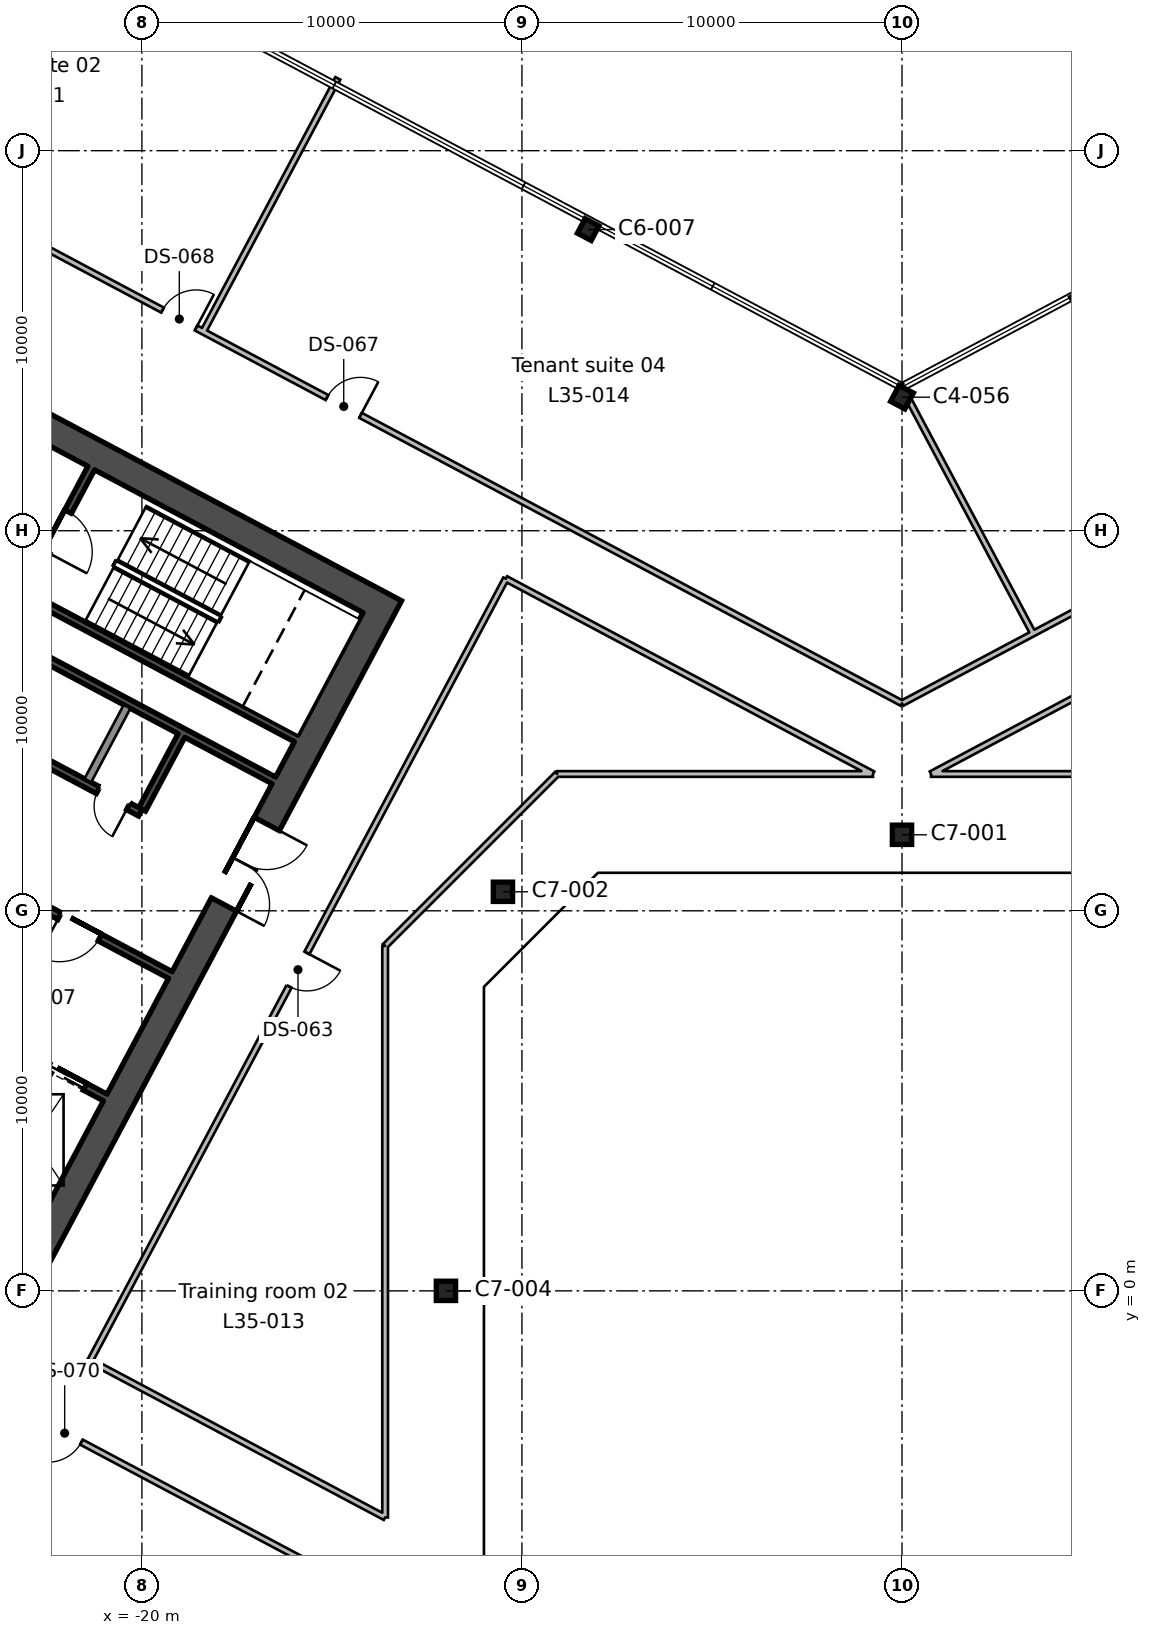
"""IFC4 building model, lengths in metres.
Left out: names, types, materials, properties, quantities, classifications, styles, units other than length and angle.
Written with IfcOpenShell. Run it as: python <this file> out.ifc"""

import sys

from ifc_helpers import new_model, si_unit, direction, frame, frame_2d, origin, origin_2d, place, context, subcontext, project, spatial, rectangle, hollow_rectangle, i_section, extrude, element, fill, save


model = new_model("IFC4")
c1 = context("Model", 3, precision=1e-05, world=origin(), true_north=direction((0.0, 1.0)))
c2 = subcontext(c1, "Body", "Model", "MODEL_VIEW")
j1 = project(units=[si_unit("LENGTHUNIT", "METRE"), si_unit("PLANEANGLEUNIT", "RADIAN")], contexts=[c1])
p1 = place(None, origin())
s1 = spatial("IfcSite", under=j1, at=p1, CompositionType="ELEMENT")
p2 = place(p1, origin())
s2 = spatial("IfcBuilding", under=s1, at=p2, CompositionType="ELEMENT")
p3 = place(p2, frame((0.0, 0.0, 166.2)))
s3 = spatial("IfcBuildingStorey", under=s2, at=p3, CompositionType="ELEMENT", Elevation=166.2)
for number, where, z_axis, x_axis in (
    (1, (-12.0, 0.0, 0.0), (0.0, 0.0, 1.0), (1.0, 0.0, 0.0)),
    (2, (-10.5, 10.5, 0.0), (0.0, 0.0, 1.0), (1.0, 0.0, 0.0)),
    (3, (0.0, 12.0, 0.0), (0.0, 0.0, 1.0), (1.0, 0.0, 0.0)),
):
    element("IfcColumn", number, at=place(p3, frame(where, z_axis=z_axis, x_axis=x_axis)), inside=s3, PredefinedType="COLUMN", context=c2, shape_type="SweptSolid", body=[
        extrude(hollow_rectangle(XDim=0.508, YDim=0.508, WallThickness=0.012, InnerFilletRadius=0.006, OuterFilletRadius=0.018, at=origin_2d()), origin(), (0.0, 0.0, 1.0), 4.0),
    ])
p4 = place(p3, frame((0.0, 23.514, 0.0), z_axis=(0.0, 0.0, 1.0), x_axis=(-0.882947592859, 0.469471562786, 0.0)))
e4 = element("IfcColumn", 4, at=p4, inside=s3, PredefinedType="COLUMN", context=c2, shape_type="SweptSolid", body=[
    extrude(i_section(OverallWidth=0.424, OverallDepth=0.475, WebThickness=0.048, FlangeThickness=0.077, FilletRadius=0.015, at=origin_2d()), origin(), (0.0, 0.0, 1.0), 4.0),
])
for number, where, z_axis, x_axis in (
    (5, (4.725, 26.047, 0.0), (0.0, 0.0, 1.0), (-0.883, -0.469, 0.0)),
    (6, (-8.257, 27.925, 0.0), (0.0, 0.0, 1.0), (-0.883, 0.469, 0.0)),
):
    element("IfcColumn", number, at=place(p3, frame(where, z_axis=z_axis, x_axis=x_axis)), inside=s3, PredefinedType="COLUMN", context=c2, shape_type="SweptSolid", body=[
        extrude(i_section(OverallWidth=0.412, OverallDepth=0.434, WebThickness=0.036, FlangeThickness=0.057, FilletRadius=0.015, at=origin_2d()), origin(), (0.0, 0.0, 1.0), 4.0),
    ])
p5 = place(p3, frame((-13.498, 18.333, 0.0), z_axis=(0.0, 0.0, 1.0), x_axis=(-0.469469918705, -0.88294846703, 0.0)))
e7 = element("IfcWall", 7, at=p5, inside=s3, PredefinedType="SHEAR", context=c2, shape_type="SweptSolid", body=[
    extrude(rectangle(XDim=19.7, YDim=0.75, at=frame_2d((9.85, 0.0))), origin(), (0.0, 0.0, 1.0), 4.0),
])
p6 = place(p5, frame((6.85, 0.0, 0.0)))
e8 = element("IfcOpeningElement", 8, at=p6, cuts=e7, PredefinedType="OPENING", context=c2, shape_type="SweptSolid", body=[
    extrude(rectangle(XDim=2.4, YDim=2.4, at=frame_2d((1.2, 1.2))), frame((0.0, 0.385, 0.0), z_axis=(0.0, -1.0, 0.0), x_axis=(1.0, 0.0, 0.0)), (0.0, 0.0, 1.0), 0.77),
])
p7 = place(p3, frame((-14.005, 18.178, 0.0), z_axis=(0.0, 0.0, 1.0), x_axis=(-0.88295010195, 0.469466843842, 0.0)))
e9 = element("IfcWall", 9, at=p7, inside=s3, PredefinedType="SHEAR", context=c2, shape_type="SweptSolid", body=[
    extrude(rectangle(XDim=20.2, YDim=0.75, at=frame_2d((10.1, 0.0))), origin(), (0.0, 0.0, 1.0), 4.0),
])
p8 = place(p3, frame((-18.96, 14.611, 0.0), z_axis=(0.0, 0.0, 1.0), x_axis=(-0.4694473164, -0.882960484464, 0.0)))
e10 = element("IfcWall", 10, at=p8, inside=s3, PredefinedType="SHEAR", context=c2, shape_type="SweptSolid", body=[
    extrude(rectangle(XDim=2.2, YDim=0.2, at=frame_2d((1.1, 0.0))), origin(), (0.0, 0.0, 1.0), 4.0),
])
p9 = place(p3, frame((-20.39, 15.372, 0.0), z_axis=(0.0, 0.0, 1.0), x_axis=(-0.4694473164, -0.882960484464, 0.0)))
e11 = element("IfcWall", 11, at=p9, inside=s3, PredefinedType="SOLIDWALL", context=c2, shape_type="SweptSolid", body=[
    extrude(rectangle(XDim=2.2, YDim=0.2, at=frame_2d((1.1, 0.0))), origin(), (0.0, 0.0, 1.0), 4.0),
])
p10 = place(p3, frame((-21.333, 21.649, 0.0), z_axis=(0.0, 0.0, 1.0), x_axis=(-0.469494272526, -0.882935517501, 0.0)))
e12 = element("IfcWall", 12, at=p10, inside=s3, PredefinedType="SHEAR", context=c2, shape_type="SweptSolid", body=[
    extrude(rectangle(XDim=7.3, YDim=0.2, at=frame_2d((3.65, 0.0))), origin(), (0.0, 0.0, 1.0), 4.0),
])
p11 = place(p10, frame((1.3, 0.0, 0.0)))
e13 = element("IfcOpeningElement", 13, at=p11, cuts=e12, PredefinedType="OPENING", context=c2, shape_type="SweptSolid", body=[
    extrude(rectangle(XDim=1.2, YDim=2.1, at=frame_2d((0.6, 1.05))), frame((0.0, 0.11, 0.0), z_axis=(0.0, -1.0, 0.0), x_axis=(1.0, 0.0, 0.0)), (0.0, 0.0, 1.0), 0.22),
])
p12 = place(p3, frame((-15.942, 14.536, 0.0), z_axis=(0.0, 0.0, 1.0), x_axis=(-0.882946947542, 0.469472776449, 0.0)))
e14 = element("IfcWall", 14, at=p12, inside=s3, PredefinedType="SHEAR", context=c2, shape_type="SweptSolid", body=[
    extrude(rectangle(XDim=8.0, YDim=0.2, at=frame_2d((4.0, 0.0))), origin(), (0.0, 0.0, 1.0), 4.0),
])
p13 = place(p3, frame((-16.529, 13.432, 0.0), z_axis=(0.0, 0.0, 1.0), x_axis=(-0.88295287151, 0.469461634952, 0.0)))
e15 = element("IfcWall", 15, at=p13, inside=s3, PredefinedType="SHEAR", context=c2, shape_type="SweptSolid", body=[
    extrude(rectangle(XDim=8.0, YDim=0.2, at=frame_2d((4.0, 0.0))), origin(), (0.0, 0.0, 1.0), 4.0),
])
p14 = place(p3, frame((-20.04, 12.581, 0.0), z_axis=(0.0, 0.0, 1.0), x_axis=(-0.882942972946, 0.469480251476, 0.0)))
e16 = element("IfcWall", 16, at=p14, inside=s3, PredefinedType="SHEAR", context=c2, shape_type="SweptSolid", body=[
    extrude(rectangle(XDim=5.4, YDim=0.2, at=frame_2d((2.7, 0.0))), origin(), (0.0, 0.0, 1.0), 4.0),
])
p15 = place(p14, frame((0.36, 0.0, 0.0)))
e17 = element("IfcOpeningElement", 17, at=p15, cuts=e16, PredefinedType="OPENING", context=c2, shape_type="SweptSolid", body=[
    extrude(rectangle(XDim=0.9, YDim=2.1, at=frame_2d((0.45, 1.05))), frame((0.0, 0.11, 0.0), z_axis=(0.0, -1.0, 0.0), x_axis=(1.0, 0.0, 0.0)), (0.0, 0.0, 1.0), 0.22),
])
p16 = place(p14, frame((3.06, 0.0, 0.0)))
e18 = element("IfcOpeningElement", 18, at=p16, cuts=e16, PredefinedType="OPENING", context=c2, shape_type="SweptSolid", body=[
    extrude(rectangle(XDim=0.9, YDim=2.1, at=frame_2d((0.45, 1.05))), frame((0.0, 0.11, 0.0), z_axis=(0.0, -1.0, 0.0), x_axis=(1.0, 0.0, 0.0)), (0.0, 0.0, 1.0), 0.22),
])
p17 = place(p3, frame((-19.252, 8.311, 0.0), z_axis=(0.0, 0.0, 1.0), x_axis=(-0.882955722218, 0.469456273365, 0.0)))
e19 = element("IfcWall", 19, at=p17, inside=s3, PredefinedType="SHEAR", context=c2, shape_type="SweptSolid", body=[
    extrude(rectangle(XDim=10.0, YDim=0.2, at=frame_2d((5.0, 0.0))), origin(), (0.0, 0.0, 1.0), 4.0),
])
p18 = place(p17, frame((2.1, 0.0, 0.0)))
e20 = element("IfcOpeningElement", 20, at=p18, cuts=e19, PredefinedType="OPENING", context=c2, shape_type="SweptSolid", body=[
    extrude(rectangle(XDim=1.2, YDim=2.1, at=frame_2d((0.6, 1.05))), frame((0.0, 0.11, 0.0), z_axis=(0.0, -1.0, 0.0), x_axis=(1.0, 0.0, 0.0)), (0.0, 0.0, 1.0), 0.22),
])
p19 = place(p3, frame((-20.965, 5.088, 0.0), z_axis=(0.0, 0.0, 1.0), x_axis=(-0.882925986334, 0.469512196493, 0.0)))
e21 = element("IfcWall", 21, at=p19, inside=s3, PredefinedType="SHEAR", context=c2, shape_type="SweptSolid", body=[
    extrude(rectangle(XDim=4.5, YDim=0.2, at=frame_2d((2.25, 0.0))), origin(), (0.0, 0.0, 1.0), 4.0),
])
p20 = place(p19, frame((0.6, 0.0, 0.0)))
e22 = element("IfcOpeningElement", 22, at=p20, cuts=e21, PredefinedType="OPENING", context=c2, shape_type="SweptSolid", body=[
    extrude(rectangle(XDim=1.1, YDim=2.1, at=frame_2d((0.55, 1.05))), frame((0.0, 0.11, 0.0), z_axis=(0.0, -1.0, 0.0), x_axis=(1.0, 0.0, 0.0)), (0.0, 0.0, 1.0), 0.22),
])
p21 = place(p3, frame((-13.6, -8.228, 0.0), z_axis=(0.0, 0.0, 1.0), x_axis=(-0.882954510497, 0.469458552369, 0.0)))
e23 = element("IfcWall", 23, at=p21, inside=s3, PredefinedType="PARTITIONING", context=c2, shape_type="SweptSolid", body=[
    extrude(rectangle(XDim=34.953, YDim=0.15, at=frame_2d((17.477, 0.0))), origin(), (0.0, 0.0, 1.0), 3.64),
])
p22 = place(p21, frame((16.55, 0.0, 0.0)))
e24 = element("IfcOpeningElement", 24, at=p22, cuts=e23, PredefinedType="OPENING", context=c2, shape_type="SweptSolid", body=[
    extrude(rectangle(XDim=1.8, YDim=2.1, at=frame_2d((0.9, 1.05))), frame((0.0, 0.085, 0.0), z_axis=(0.0, -1.0, 0.0), x_axis=(1.0, 0.0, 0.0)), (0.0, 0.0, 1.0), 0.17),
])
p23 = place(p21, frame((9.05, 0.0, 0.0)))
e25 = element("IfcOpeningElement", 25, at=p23, cuts=e23, PredefinedType="OPENING", context=c2, shape_type="SweptSolid", body=[
    extrude(rectangle(XDim=1.0, YDim=2.1, at=frame_2d((0.5, 1.05))), frame((0.0, 0.085, 0.0), z_axis=(0.0, -1.0, 0.0), x_axis=(1.0, 0.0, 0.0)), (0.0, 0.0, 1.0), 0.17),
])
p24 = place(p3, frame((-29.302, 31.04, 0.0), z_axis=(0.0, 0.0, 1.0), x_axis=(0.882948500672, -0.469469855433, 0.0)))
e26 = element("IfcWall", 26, at=p24, inside=s3, PredefinedType="PARTITIONING", context=c2, shape_type="SweptSolid", body=[
    extrude(rectangle(XDim=33.187, YDim=0.15, at=frame_2d((16.593, 0.0))), origin(), (0.0, 0.0, 1.0), 3.64),
])
p25 = place(p24, frame((16.05, 0.0, 0.0)))
e27 = element("IfcOpeningElement", 27, at=p25, cuts=e26, PredefinedType="OPENING", context=c2, shape_type="SweptSolid", body=[
    extrude(rectangle(XDim=1.0, YDim=2.1, at=frame_2d((0.5, 1.05))), frame((0.0, 0.085, 0.0), z_axis=(0.0, -1.0, 0.0), x_axis=(1.0, 0.0, 0.0)), (0.0, 0.0, 1.0), 0.17),
])
p26 = place(p24, frame((11.15, 0.0, 0.0)))
e28 = element("IfcOpeningElement", 28, at=p26, cuts=e26, PredefinedType="OPENING", context=c2, shape_type="SweptSolid", body=[
    extrude(rectangle(XDim=1.0, YDim=2.1, at=frame_2d((0.5, 1.05))), frame((0.0, 0.085, 0.0), z_axis=(0.0, -1.0, 0.0), x_axis=(1.0, 0.0, 0.0)), (0.0, 0.0, 1.0), 0.17),
])
p27 = place(p3, frame((0.0, 15.46, 0.0), z_axis=(0.0, 0.0, 1.0), x_axis=(0.882949722977, 0.469467556594, 0.0)))
e29 = element("IfcWall", 29, at=p27, inside=s3, PredefinedType="PARTITIONING", context=c2, shape_type="SweptSolid", body=[
    extrude(rectangle(XDim=20.021, YDim=0.15, at=frame_2d((10.01, 0.0))), origin(), (0.0, 0.0, 1.0), 3.64),
])
p28 = place(p27, frame((9.55, 0.0, 0.0)))
e30 = element("IfcOpeningElement", 30, at=p28, cuts=e29, PredefinedType="OPENING", context=c2, shape_type="SweptSolid", body=[
    extrude(rectangle(XDim=1.0, YDim=2.1, at=frame_2d((0.5, 1.05))), frame((0.0, 0.085, 0.0), z_axis=(0.0, -1.0, 0.0), x_axis=(1.0, 0.0, 0.0)), (0.0, 0.0, 1.0), 0.17),
])
p29 = place(p3, frame((-14.844, 31.903, 0.0), z_axis=(0.0, 0.0, 1.0), x_axis=(-0.469271860983, -0.883053747226, 0.0)))
e31 = element("IfcWall", 31, at=p29, inside=s3, PredefinedType="PARTITIONING", context=c2, shape_type="SweptSolid", body=[
    extrude(rectangle(XDim=7.55, YDim=0.15, at=frame_2d((3.775, 0.0))), origin(), (0.0, 0.0, 1.0), 3.64),
])
p30 = place(p3, frame((0.191, 23.422, 0.0), z_axis=(0.0, 0.0, 1.0), x_axis=(0.46954180368, -0.882910241529, 0.0)))
e32 = element("IfcWall", 32, at=p30, inside=s3, PredefinedType="PARTITIONING", context=c2, shape_type="SweptSolid", body=[
    extrude(rectangle(XDim=6.941, YDim=0.15, at=frame_2d((3.47, 0.0))), origin(), (0.0, 0.0, 1.0), 3.64),
])
p31 = place(p3, frame((-21.362, -1.836, 0.0), z_axis=(0.0, 0.0, 1.0), x_axis=(0.469442492633, 0.88296304912, 0.0)))
e33 = element("IfcWall", 33, at=p31, inside=s3, PredefinedType="PARTITIONING", context=c2, shape_type="SweptSolid", body=[
    extrude(rectangle(XDim=23.3, YDim=0.15, at=frame_2d((11.65, 0.0))), origin(), (0.0, 0.0, 1.0), 3.64),
])
p32 = place(p31, frame((11.15, 0.0, 0.0)))
e34 = element("IfcOpeningElement", 34, at=p32, cuts=e33, PredefinedType="OPENING", context=c2, shape_type="SweptSolid", body=[
    extrude(rectangle(XDim=1.0, YDim=2.1, at=frame_2d((0.5, 1.05))), frame((0.0, 0.085, 0.0), z_axis=(0.0, -1.0, 0.0), x_axis=(1.0, 0.0, 0.0)), (0.0, 0.0, 1.0), 0.17),
])
p33 = place(p3, frame((-10.424, 18.737, 0.0), z_axis=(0.0, 0.0, 1.0), x_axis=(0.88294579514, -0.469474943787, 0.0)))
e35 = element("IfcWall", 35, at=p33, inside=s3, PredefinedType="PARTITIONING", context=c2, shape_type="SweptSolid", body=[
    extrude(rectangle(XDim=10.942, YDim=0.15, at=frame_2d((5.471, 0.0))), origin(), (0.0, 0.0, 1.0), 3.64),
])
p34 = place(p3, frame((-0.763, 13.6, 0.0), z_axis=(0.0, 0.0, 1.0), x_axis=(-1.0, 0.0, 0.0)))
e36 = element("IfcWall", 36, at=p34, inside=s3, PredefinedType="PARTITIONING", context=c2, shape_type="SweptSolid", body=[
    extrude(rectangle(XDim=8.314, YDim=0.15, at=frame_2d((4.157, 0.0))), origin(), (0.0, 0.0, 1.0), 3.64),
])
p35 = place(p3, frame((-9.077, 13.6, 0.0), z_axis=(0.0, 0.0, 1.0), x_axis=(-0.707106781187, -0.707106781187, 0.0)))
e37 = element("IfcWall", 37, at=p35, inside=s3, PredefinedType="PARTITIONING", context=c2, shape_type="SweptSolid", body=[
    extrude(rectangle(XDim=6.397, YDim=0.15, at=frame_2d((3.198, 0.0))), origin(), (0.0, 0.0, 1.0), 3.64),
])
p36 = place(p3, frame((-13.6, 9.077, 0.0), z_axis=(0.0, 0.0, 1.0), x_axis=(0.0, -1.0, 0.0)))
e38 = element("IfcWall", 38, at=p36, inside=s3, PredefinedType="PARTITIONING", context=c2, shape_type="SweptSolid", body=[
    extrude(rectangle(XDim=15.04, YDim=0.15, at=frame_2d((7.52, 0.0))), origin(), (0.0, 0.0, 1.0), 3.64),
])
p37 = place(p3, frame((-13.6, -5.963, 0.0), z_axis=(0.0, 0.0, 1.0), x_axis=(-0.882954936964, 0.469457750273, 0.0)))
e39 = element("IfcWall", 39, at=p37, inside=s3, PredefinedType="PARTITIONING", context=c2, shape_type="SweptSolid", body=[
    extrude(rectangle(XDim=8.791, YDim=0.15, at=frame_2d((4.396, 0.0))), origin(), (0.0, 0.0, 1.0), 3.64),
])
p38 = place(p3, frame((0.763, 13.6, 0.0), z_axis=(0.0, 0.0, 1.0), x_axis=(1.0, 0.0, 0.0)))
e40 = element("IfcWall", 40, at=p38, inside=s3, PredefinedType="PARTITIONING", context=c2, shape_type="SweptSolid", body=[
    extrude(rectangle(XDim=7.862, YDim=0.15, at=frame_2d((3.931, 0.0))), origin(), (0.0, 0.0, 1.0), 3.64),
])
p39 = place(p3, frame((6.892, 16.859, 0.0), z_axis=(0.0, 0.0, 1.0), x_axis=(-0.882955833877, -0.469456063357, 0.0)))
e41 = element("IfcWall", 41, at=p39, inside=s3, PredefinedType="PARTITIONING", context=c2, shape_type="SweptSolid", body=[
    extrude(rectangle(XDim=6.942, YDim=0.15, at=frame_2d((3.471, 0.0))), origin(), (0.0, 0.0, 1.0), 3.64),
])
p40 = place(p6, origin())
e42 = element("IfcDoor", 42, at=p40, inside=s3, OperationType="DOUBLE_DOOR_SINGLE_SWING", PredefinedType="DOOR", context=c2, shape_type="SweptSolid", body=[
    extrude(rectangle(XDim=2.4, YDim=2.4, at=frame_2d((1.2, 1.2))), frame((0.0, 0.025, 0.0), z_axis=(0.0, -1.0, 0.0), x_axis=(1.0, 0.0, 0.0)), (0.0, 0.0, 1.0), 0.05),
])
fill(e8, e42)
p41 = place(p18, origin())
e43 = element("IfcDoor", 43, at=p41, inside=s3, OperationType="SINGLE_SWING_RIGHT", PredefinedType="DOOR", context=c2, shape_type="SweptSolid", body=[
    extrude(rectangle(XDim=1.2, YDim=2.1, at=frame_2d((0.6, 1.05))), frame((0.0, 0.025, 0.0), z_axis=(0.0, -1.0, 0.0), x_axis=(1.0, 0.0, 0.0)), (0.0, 0.0, 1.0), 0.05),
])
fill(e20, e43)
p42 = place(p11, origin())
e44 = element("IfcDoor", 44, at=p42, inside=s3, OperationType="SINGLE_SWING_RIGHT", PredefinedType="DOOR", context=c2, shape_type="SweptSolid", body=[
    extrude(rectangle(XDim=1.2, YDim=2.1, at=frame_2d((0.6, 1.05))), frame((0.0, 0.025, 0.0), z_axis=(0.0, -1.0, 0.0), x_axis=(1.0, 0.0, 0.0)), (0.0, 0.0, 1.0), 0.05),
])
fill(e13, e44)
p43 = place(p15, origin())
e45 = element("IfcDoor", 45, at=p43, inside=s3, OperationType="SINGLE_SWING_LEFT", PredefinedType="DOOR", context=c2, shape_type="SweptSolid", body=[
    extrude(rectangle(XDim=0.9, YDim=2.1, at=frame_2d((0.45, 1.05))), frame((0.0, 0.025, 0.0), z_axis=(0.0, -1.0, 0.0), x_axis=(1.0, 0.0, 0.0)), (0.0, 0.0, 1.0), 0.05),
])
fill(e17, e45)
p44 = place(p20, origin())
e46 = element("IfcDoor", 46, at=p44, inside=s3, OperationType="DOUBLE_DOOR_SLIDING", PredefinedType="DOOR", context=c2, shape_type="SweptSolid", body=[
    extrude(rectangle(XDim=1.1, YDim=2.1, at=frame_2d((0.55, 1.05))), frame((0.0, 0.025, 0.0), z_axis=(0.0, -1.0, 0.0), x_axis=(1.0, 0.0, 0.0)), (0.0, 0.0, 1.0), 0.05),
])
fill(e22, e46)
p45 = place(p32, frame((1.0, 0.0, 0.0), z_axis=(0.0, 0.0, 1.0), x_axis=(-1.0, 0.0, 0.0)))
e47 = element("IfcDoor", 47, at=p45, inside=s3, OperationType="SINGLE_SWING_LEFT", PredefinedType="DOOR", context=c2, shape_type="SweptSolid", body=[
    extrude(rectangle(XDim=1.0, YDim=2.1, at=frame_2d((0.5, 1.05))), frame((0.0, 0.025, 0.0), z_axis=(0.0, -1.0, 0.0), x_axis=(1.0, 0.0, 0.0)), (0.0, 0.0, 1.0), 0.05),
])
fill(e34, e47)
p46 = place(p25, origin())
e48 = element("IfcDoor", 48, at=p46, inside=s3, OperationType="SINGLE_SWING_RIGHT", PredefinedType="DOOR", context=c2, shape_type="SweptSolid", body=[
    extrude(rectangle(XDim=1.0, YDim=2.1, at=frame_2d((0.5, 1.05))), frame((0.0, 0.025, 0.0), z_axis=(0.0, -1.0, 0.0), x_axis=(1.0, 0.0, 0.0)), (0.0, 0.0, 1.0), 0.05),
])
fill(e27, e48)
p47 = place(p26, origin())
e49 = element("IfcDoor", 49, at=p47, inside=s3, OperationType="SINGLE_SWING_RIGHT", PredefinedType="DOOR", context=c2, shape_type="SweptSolid", body=[
    extrude(rectangle(XDim=1.0, YDim=2.1, at=frame_2d((0.5, 1.05))), frame((0.0, 0.025, 0.0), z_axis=(0.0, -1.0, 0.0), x_axis=(1.0, 0.0, 0.0)), (0.0, 0.0, 1.0), 0.05),
])
fill(e28, e49)
p48 = place(p23, origin())
e50 = element("IfcDoor", 50, at=p48, inside=s3, OperationType="SINGLE_SWING_RIGHT", PredefinedType="DOOR", context=c2, shape_type="SweptSolid", body=[
    extrude(rectangle(XDim=1.0, YDim=2.1, at=frame_2d((0.5, 1.05))), frame((0.0, 0.025, 0.0), z_axis=(0.0, -1.0, 0.0), x_axis=(1.0, 0.0, 0.0)), (0.0, 0.0, 1.0), 0.05),
])
fill(e25, e50)
save(model, sys.argv[1])
